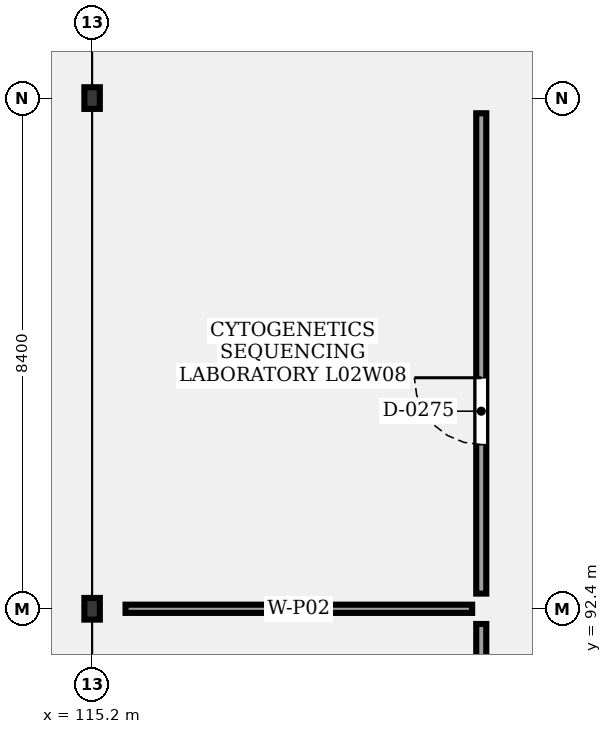
"""IFC4 building model, lengths in metres.
Left out: names, types, materials, properties, quantities, classifications, styles, units other than length and angle.
Written with IfcOpenShell. Run it as: python <this file> out.ifc"""

import sys

from ifc_helpers import new_model, si_unit, direction, frame, frame_2d, origin, origin_2d, place, context, subcontext, project, spatial, rectangle, i_section, extrude, element, fill, save


model = new_model("IFC4")
c1 = context("Model", 3, precision=1e-05, world=origin(), true_north=direction((0.0, 1.0)))
c2 = subcontext(c1, "Body", "Model", "MODEL_VIEW")
j1 = project(units=[si_unit("LENGTHUNIT", "METRE"), si_unit("PLANEANGLEUNIT", "RADIAN")], contexts=[c1])
p1 = place(None, origin())
s1 = spatial("IfcSite", under=j1, at=p1, CompositionType="ELEMENT")
p2 = place(p1, origin())
s2 = spatial("IfcBuilding", under=s1, at=p2, CompositionType="ELEMENT")
p3 = place(p2, frame((0.0, 0.0, 9.9)))
s3 = spatial("IfcBuildingStorey", under=s2, at=p3, CompositionType="ELEMENT", Elevation=9.9)
for number, where, z_axis, x_axis in (
    (1, (115.2, 92.4, 0.0), (0.0, 0.0, 1.0), (0.0, -1.0, 0.0)),
    (2, (115.2, 100.8, 0.0), (0.0, 0.0, 1.0), (0.0, -1.0, 0.0)),
):
    element("IfcColumn", number, at=place(p3, frame(where, z_axis=z_axis, x_axis=x_axis)), inside=s3, PredefinedType="COLUMN", context=c2, shape_type="SweptSolid", body=[
        extrude(i_section(OverallWidth=0.254, OverallDepth=0.356, WebThickness=0.011, FlangeThickness=0.018, at=origin_2d()), origin(), (0.0, 0.0, 1.0), 3.6),
    ])
p4 = place(p3, frame((121.6, 84.25, 0.0), z_axis=(0.0, 0.0, 1.0), x_axis=(0.0, 1.0, 0.0)))
e3 = element("IfcWall", 3, at=p4, inside=s3, PredefinedType="PARTITIONING", context=c2, shape_type="SweptSolid", body=[
    extrude(rectangle(XDim=7.9, YDim=0.165, at=frame_2d((3.95, 0.0))), origin(), (0.0, 0.0, 1.0), 2.48),
])
p5 = place(p4, frame((2.45, 0.0, 0.0)))
e4 = element("IfcOpeningElement", 4, at=p5, cuts=e3, PredefinedType="OPENING", context=c2, shape_type="SweptSolid", body=[
    extrude(rectangle(XDim=1.1, YDim=2.4, at=frame_2d((0.55, 1.2))), frame((0.0, 0.093, 0.0), z_axis=(0.0, -1.0, 0.0), x_axis=(1.0, 0.0, 0.0)), (0.0, 0.0, 1.0), 0.185),
])
p6 = place(p3, frame((121.6, 92.65, 0.0), z_axis=(0.0, 0.0, 1.0), x_axis=(0.0, 1.0, 0.0)))
e5 = element("IfcWall", 5, at=p6, inside=s3, PredefinedType="PARTITIONING", context=c2, shape_type="SweptSolid", body=[
    extrude(rectangle(XDim=7.9, YDim=0.165, at=frame_2d((3.95, 0.0))), origin(), (0.0, 0.0, 1.0), 2.48),
])
p7 = place(p6, frame((2.45, 0.0, 0.0)))
e6 = element("IfcOpeningElement", 6, at=p7, cuts=e5, PredefinedType="OPENING", context=c2, shape_type="SweptSolid", body=[
    extrude(rectangle(XDim=1.1, YDim=2.4, at=frame_2d((0.55, 1.2))), frame((0.0, 0.093, 0.0), z_axis=(0.0, -1.0, 0.0), x_axis=(1.0, 0.0, 0.0)), (0.0, 0.0, 1.0), 0.185),
])
p8 = place(p3, frame((115.75, 92.4, 0.0), z_axis=(0.0, 0.0, 1.0), x_axis=(1.0, 0.0, 0.0)))
e7 = element("IfcWall", 7, at=p8, inside=s3, PredefinedType="PARTITIONING", context=c2, shape_type="SweptSolid", body=[
    extrude(rectangle(XDim=5.7, YDim=0.135, at=frame_2d((2.85, 0.0))), origin(), (0.0, 0.0, 1.0), 2.48),
])
p9 = place(p7, origin())
e8 = element("IfcDoor", 8, at=p9, inside=s3, OperationType="SINGLE_SWING_RIGHT", PredefinedType="DOOR", context=c2, shape_type="SweptSolid", body=[
    extrude(rectangle(XDim=1.1, YDim=2.4, at=frame_2d((0.55, 1.2))), frame((0.0, 0.025, 0.0), z_axis=(0.0, -1.0, 0.0), x_axis=(1.0, 0.0, 0.0)), (0.0, 0.0, 1.0), 0.05),
])
fill(e6, e8)
save(model, sys.argv[1])
